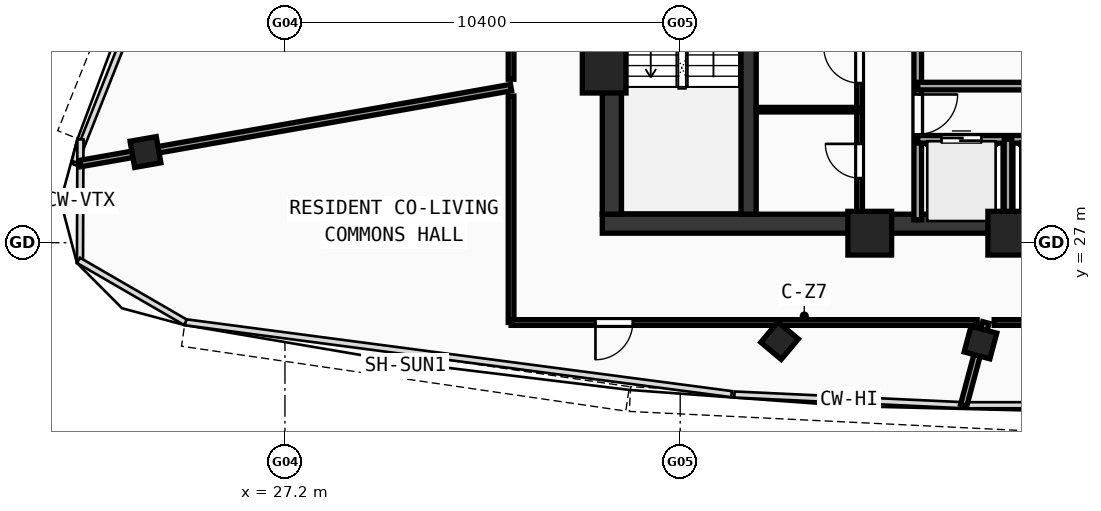
"""IFC4 building model, lengths in metres.
Left out: names, types, materials, properties, quantities, classifications, styles, units other than length and angle.
Written with IfcOpenShell. Run it as: python <this file> out.ifc"""

import sys

from ifc_helpers import new_model, si_unit, direction, frame, frame_2d, origin, origin_with_axes, origin_2d, place, context, subcontext, project, spatial, rectangle, hollow_rectangle, extrude, source, transform, mapped, element, fill, save


model = new_model("IFC4")
c1 = context("Model", 3, precision=1e-05, world=origin(), true_north=direction((0.0, 1.0)))
c2 = subcontext(c1, "Body", "Model", "MODEL_VIEW")
j1 = project(units=[si_unit("LENGTHUNIT", "METRE"), si_unit("PLANEANGLEUNIT", "RADIAN")], contexts=[c1])
p1 = place(None, origin())
s1 = spatial("IfcSite", under=j1, at=p1, CompositionType="ELEMENT")
p2 = place(p1, origin())
s2 = spatial("IfcBuilding", under=s1, at=p2, CompositionType="ELEMENT")
p3 = place(p2, frame((0.0, 0.0, 359.26)))
s3 = spatial("IfcBuildingStorey", under=s2, at=p3, CompositionType="ELEMENT", Elevation=359.26)
p4 = place(p3, frame((35.55, 27.5, 0.0), z_axis=(0.0, 0.0, 1.0), x_axis=(1.0, 0.0, 0.0)))
e1 = element("IfcWall", 1, at=p4, inside=s3, PredefinedType="SHEAR", context=c2, shape_type="SweptSolid", body=[
    extrude(rectangle(XDim=24.9, YDim=0.5, at=frame_2d((12.45, 0.0))), origin(), (0.0, 0.0, 1.0), 3.49),
])
p5 = place(p3, frame((35.8, 27.75, 0.0), z_axis=(0.0, 0.0, 1.0), x_axis=(0.0, 1.0, 0.0)))
e2 = element("IfcWall", 2, at=p5, inside=s3, PredefinedType="SHEAR", context=c2, shape_type="SweptSolid", body=[
    extrude(rectangle(XDim=12.2, YDim=0.5, at=frame_2d((6.1, 0.0))), origin(), (0.0, 0.0, 1.0), 3.49),
])
p6 = place(p3, frame((39.4, 27.75, 0.0), z_axis=(0.0, 0.0, 1.0), x_axis=(0.0, 1.0, 0.0)))
e3 = element("IfcWall", 3, at=p6, inside=s3, PredefinedType="SHEAR", context=c2, shape_type="SweptSolid", body=[
    extrude(rectangle(XDim=12.2, YDim=0.4, at=frame_2d((6.1, 0.0))), origin(), (0.0, 0.0, 1.0), 3.49),
])
p7 = place(p6, frame((10.0, 0.0, 0.0)))
e4 = element("IfcOpeningElement", 4, at=p7, cuts=e3, PredefinedType="OPENING", context=c2, shape_type="SweptSolid", body=[
    extrude(rectangle(XDim=1.1, YDim=2.1, at=frame_2d((0.55, 1.05))), frame((0.0, 0.21, 0.0), z_axis=(0.0, -1.0, 0.0), x_axis=(1.0, 0.0, 0.0)), (0.0, 0.0, 1.0), 0.42),
])
m1 = source(origin(), c2, "Body", "SweptSolid", [
    extrude(hollow_rectangle(XDim=1.15, YDim=1.15, WallThickness=0.048, at=origin_2d()), origin(), (0.0, 0.0, 1.0), 3.75),
])
for number, where, z_axis, x_axis in (
    (5, (42.588, 27.25, -0.26), (0.0, 0.0, 1.0), (1.0, 0.0, 0.0)),
    (6, (46.272, 27.25, -0.26), (0.0, 0.0, 1.0), (1.0, 0.0, 0.0)),
    (7, (35.6, 31.513, -0.26), (0.0, 0.0, 1.0), (1.0, 0.0, 0.0)),
):
    element("IfcColumn", number, at=place(p3, frame(where, z_axis=z_axis, x_axis=x_axis)), inside=s3, PredefinedType="COLUMN", context=c2, shape_type="MappedRepresentation", body=[
        mapped(m1, transform((0.0, 0.0, 0.0), scale=1.0)),
    ])
m2 = source(origin(), c2, "Body", "SweptSolid", [
    extrude(hollow_rectangle(XDim=0.7, YDim=0.7, WallThickness=0.026, at=origin_2d()), origin(), (0.0, 0.0, 1.0), 3.75),
])
for number, where, z_axis, x_axis in (
    (8, (40.215, 24.422, -0.26), (0.0, 0.0, 1.0), (0.766, -0.643, 0.0)),
    (9, (45.501, 24.373, -0.26), (0.0, 0.0, 1.0), (0.966, -0.259, 0.0)),
    (10, (23.53, 29.385, -0.26), (0.0, 0.0, 1.0), (0.174, -0.985, 0.0)),
):
    element("IfcColumn", number, at=place(p3, frame(where, z_axis=z_axis, x_axis=x_axis)), inside=s3, PredefinedType="COLUMN", context=c2, shape_type="MappedRepresentation", body=[
        mapped(m2, transform((0.0, 0.0, 0.0), scale=1.0)),
    ])
p8 = place(p3, frame((43.85, 27.6, 0.0), z_axis=(0.0, 0.0, 1.0), x_axis=(0.0, 1.0, 0.0)))
e11 = element("IfcWall", 11, at=p8, inside=s3, PredefinedType="SOLIDWALL", context=c2, shape_type="SweptSolid", body=[
    extrude(rectangle(XDim=6.22, YDim=0.2, at=frame_2d((3.11, 0.0))), origin(), (0.0, 0.0, 1.0), 3.49),
])
p9 = place(p8, frame((2.25, 0.0, 0.0)))
e12 = element("IfcOpeningElement", 12, at=p9, cuts=e11, PredefinedType="OPENING", context=c2, shape_type="SweptSolid", body=[
    extrude(rectangle(XDim=1.05, YDim=2.1, at=frame_2d((0.525, 1.05))), frame((0.0, 0.11, 0.0), z_axis=(0.0, -1.0, 0.0), x_axis=(1.0, 0.0, 0.0)), (0.0, 0.0, 1.0), 0.22),
])
p10 = place(p3, frame((43.85, 29.72, 0.0), z_axis=(0.0, 0.0, 1.0), x_axis=(1.0, 0.0, 0.0)))
e13 = element("IfcWall", 13, at=p10, inside=s3, PredefinedType="SOLIDWALL", context=c2, shape_type="SweptSolid", body=[
    extrude(rectangle(XDim=7.2, YDim=0.2, at=frame_2d((3.6, 0.0))), origin(), (0.0, 0.0, 1.0), 3.49),
])
p11 = place(p10, frame((0.625, 0.0, 0.0)))
e14 = element("IfcOpeningElement", 14, at=p11, cuts=e13, PredefinedType="OPENING", context=c2, shape_type="SweptSolid", body=[
    extrude(rectangle(XDim=1.05, YDim=2.1, at=frame_2d((0.525, 1.05))), frame((0.0, 0.11, 0.0), z_axis=(0.0, -1.0, 0.0), x_axis=(1.0, 0.0, 0.0)), (0.0, 0.0, 1.0), 0.22),
])
p12 = place(p10, frame((3.075, 0.0, 0.0)))
e15 = element("IfcOpeningElement", 15, at=p12, cuts=e13, PredefinedType="OPENING", context=c2, shape_type="SweptSolid", body=[
    extrude(rectangle(XDim=1.05, YDim=2.1, at=frame_2d((0.525, 1.05))), frame((0.0, 0.11, 0.0), z_axis=(0.0, -1.0, 0.0), x_axis=(1.0, 0.0, 0.0)), (0.0, 0.0, 1.0), 0.22),
])
p13 = place(p10, frame((5.525, 0.0, 0.0)))
e16 = element("IfcOpeningElement", 16, at=p13, cuts=e13, PredefinedType="OPENING", context=c2, shape_type="SweptSolid", body=[
    extrude(rectangle(XDim=1.05, YDim=2.1, at=frame_2d((0.525, 1.05))), frame((0.0, 0.11, 0.0), z_axis=(0.0, -1.0, 0.0), x_axis=(1.0, 0.0, 0.0)), (0.0, 0.0, 1.0), 0.22),
])
p14 = place(p3, frame((43.85, 31.12, 0.0), z_axis=(0.0, 0.0, 1.0), x_axis=(1.0, 0.0, 0.0)))
e17 = element("IfcWall", 17, at=p14, inside=s3, PredefinedType="SOLIDWALL", context=c2, shape_type="SweptSolid", body=[
    extrude(rectangle(XDim=9.83, YDim=0.2, at=frame_2d((4.915, 0.0))), origin(), (0.0, 0.0, 1.0), 3.49),
])
p15 = place(p3, frame((46.225, 27.6, 0.0), z_axis=(0.0, 0.0, 1.0), x_axis=(0.0, 1.0, 0.0)))
e18 = element("IfcWall", 18, at=p15, inside=s3, PredefinedType="SOLIDWALL", context=c2, shape_type="SweptSolid", body=[
    extrude(rectangle(XDim=2.12, YDim=0.2, at=frame_2d((1.06, 0.0))), origin(), (0.0, 0.0, 1.0), 3.49),
])
p16 = place(p3, frame((42.32, 27.6, 0.0), z_axis=(0.0, 0.0, 1.0), x_axis=(0.0, 1.0, 0.0)))
e19 = element("IfcWall", 19, at=p16, inside=s3, PredefinedType="PARTITIONING", context=c2, shape_type="SweptSolid", body=[
    extrude(rectangle(XDim=5.9, YDim=0.15, at=frame_2d((2.95, 0.0))), origin(), (0.0, 0.0, 1.0), 3.49),
])
p17 = place(p16, frame((1.1, 0.0, 0.0)))
e20 = element("IfcOpeningElement", 20, at=p17, cuts=e19, PredefinedType="OPENING", context=c2, shape_type="SweptSolid", body=[
    extrude(rectangle(XDim=0.9, YDim=2.1, at=frame_2d((0.45, 1.05))), frame((0.0, 0.085, 0.0), z_axis=(0.0, -1.0, 0.0), x_axis=(1.0, 0.0, 0.0)), (0.0, 0.0, 1.0), 0.17),
])
p18 = place(p16, frame((3.6, 0.0, 0.0)))
e21 = element("IfcOpeningElement", 21, at=p18, cuts=e19, PredefinedType="OPENING", context=c2, shape_type="SweptSolid", body=[
    extrude(rectangle(XDim=0.94, YDim=2.1, at=frame_2d((0.47, 1.05))), frame((0.0, 0.085, 0.0), z_axis=(0.0, -1.0, 0.0), x_axis=(1.0, 0.0, 0.0)), (0.0, 0.0, 1.0), 0.17),
])
p19 = place(p3, frame((39.6, 30.5, 0.0), z_axis=(0.0, 0.0, 1.0), x_axis=(1.0, 0.0, 0.0)))
e22 = element("IfcWall", 22, at=p19, inside=s3, PredefinedType="PARTITIONING", context=c2, shape_type="SweptSolid", body=[
    extrude(rectangle(XDim=2.72, YDim=0.12, at=frame_2d((1.36, 0.0))), origin(), (0.0, 0.0, 1.0), 3.49),
])
p20 = place(p3, frame((33.15, 31.082, 0.0), z_axis=(0.0, 0.0, 1.0), x_axis=(-0.984809370591, -0.17363900367, 0.0)))
e23 = element("IfcWall", 23, at=p20, inside=s3, PredefinedType="PARTITIONING", context=c2, shape_type="SweptSolid", body=[
    extrude(rectangle(XDim=11.517, YDim=0.17, at=frame_2d((5.758, 0.0))), origin(), (0.0, 0.0, 1.0), 2.89),
])
p21 = place(p3, frame((45.642, 24.9, 0.0), z_axis=(0.0, 0.0, 1.0), x_axis=(-0.258842593831, -0.965919516119, 0.0)))
e24 = element("IfcWall", 24, at=p21, inside=s3, PredefinedType="PARTITIONING", context=c2, shape_type="SweptSolid", body=[
    extrude(rectangle(XDim=2.253, YDim=0.17, at=frame_2d((1.127, 0.0))), origin(), (0.0, 0.0, 1.0), 2.89),
])
p22 = place(p3, frame((33.15, 24.9, 0.0), z_axis=(0.0, 0.0, 1.0), x_axis=(0.0, 1.0, 0.0)))
e25 = element("IfcWall", 25, at=p22, inside=s3, PredefinedType="PARTITIONING", context=c2, shape_type="SweptSolid", body=[
    extrude(rectangle(XDim=5.958, YDim=0.15, at=frame_2d((2.979, 0.0))), origin(), (0.0, 0.0, 1.0), 2.89),
])
p23 = place(p3, frame((33.15, 31.301, 0.0), z_axis=(0.0, 0.0, 1.0), x_axis=(0.0, 1.0, 0.0)))
e26 = element("IfcWall", 26, at=p23, inside=s3, PredefinedType="PARTITIONING", context=c2, shape_type="SweptSolid", body=[
    extrude(rectangle(XDim=7.004, YDim=0.15, at=frame_2d((3.502, 0.0))), origin(), (0.0, 0.0, 1.0), 3.49),
])
p24 = place(p23, frame((3.027, 0.0, 0.0)))
e27 = element("IfcOpeningElement", 27, at=p24, cuts=e26, PredefinedType="OPENING", context=c2, shape_type="SweptSolid", body=[
    extrude(rectangle(XDim=0.98, YDim=2.12, at=frame_2d((0.49, 1.06))), frame((0.0, 0.085, 0.0), z_axis=(0.0, -1.0, 0.0), x_axis=(1.0, 0.0, 0.0)), (0.0, 0.0, 1.0), 0.17),
])
p25 = place(p3, frame((47.78, 24.9, 0.0), z_axis=(0.0, 0.0, 1.0), x_axis=(-1.0, 0.0, 0.0)))
e28 = element("IfcWall", 28, at=p25, inside=s3, PredefinedType="PARTITIONING", context=c2, shape_type="SweptSolid", body=[
    extrude(rectangle(XDim=1.918, YDim=0.15, at=frame_2d((0.959, 0.0))), origin(), (0.0, 0.0, 1.0), 3.49),
])
p26 = place(p3, frame((45.414, 24.9, 0.0), z_axis=(0.0, 0.0, 1.0), x_axis=(-1.0, 0.0, 0.0)))
e29 = element("IfcWall", 29, at=p26, inside=s3, PredefinedType="PARTITIONING", context=c2, shape_type="SweptSolid", body=[
    extrude(rectangle(XDim=12.264, YDim=0.15, at=frame_2d((6.132, 0.0))), origin(), (0.0, 0.0, 1.0), 2.89),
])
p27 = place(p26, frame((9.064, 0.0, 0.0)))
e30 = element("IfcOpeningElement", 30, at=p27, cuts=e29, PredefinedType="OPENING", context=c2, shape_type="SweptSolid", body=[
    extrude(rectangle(XDim=0.98, YDim=2.12, at=frame_2d((0.49, 1.06))), frame((0.0, 0.085, 0.0), z_axis=(0.0, -1.0, 0.0), x_axis=(1.0, 0.0, 0.0)), (0.0, 0.0, 1.0), 0.17),
])
m3 = source(origin(), c2, "Body", "SweptSolid", [
    extrude(rectangle(XDim=1.05, YDim=2.1, at=frame_2d((0.525, 1.05))), frame((0.0, 0.025, 0.0), z_axis=(0.0, -1.0, 0.0), x_axis=(1.0, 0.0, 0.0)), (0.0, 0.0, 1.0), 0.05),
])
p28 = place(p9, frame((1.05, 0.0, 0.0), z_axis=(0.0, 0.0, 1.0), x_axis=(-1.0, 0.0, 0.0)))
e31 = element("IfcDoor", 31, at=p28, inside=s3, OperationType="SINGLE_SWING_LEFT", PredefinedType="DOOR", context=c2, shape_type="MappedRepresentation", body=[
    mapped(m3, transform((0.0, 0.0, 0.0), scale=1.0)),
])
fill(e12, e31)
p29 = place(p11, origin_with_axes())
e32 = element("IfcDoor", 32, at=p29, inside=s3, OperationType="DOUBLE_DOOR_SLIDING", PredefinedType="DOOR", context=c2, shape_type="MappedRepresentation", body=[
    mapped(m3, transform((0.0, 0.0, 0.0), scale=1.0)),
])
fill(e14, e32)
m4 = source(origin(), c2, "Body", "SweptSolid", [
    extrude(rectangle(XDim=0.9, YDim=2.1, at=frame_2d((0.45, 1.05))), frame((0.0, 0.025, 0.0), z_axis=(0.0, -1.0, 0.0), x_axis=(1.0, 0.0, 0.0)), (0.0, 0.0, 1.0), 0.05),
])
p30 = place(p17, origin_with_axes())
e33 = element("IfcDoor", 33, at=p30, inside=s3, OperationType="SINGLE_SWING_RIGHT", PredefinedType="DOOR", context=c2, shape_type="MappedRepresentation", body=[
    mapped(m4, transform((0.0, 0.0, 0.0), scale=1.0)),
])
fill(e20, e33)
m5 = source(origin(), c2, "Body", "SweptSolid", [
    extrude(rectangle(XDim=0.94, YDim=2.1, at=frame_2d((0.47, 1.05))), frame((0.0, 0.025, 0.0), z_axis=(0.0, -1.0, 0.0), x_axis=(1.0, 0.0, 0.0)), (0.0, 0.0, 1.0), 0.05),
])
p31 = place(p18, origin_with_axes())
e34 = element("IfcDoor", 34, at=p31, inside=s3, OperationType="SINGLE_SWING_RIGHT", PredefinedType="DOOR", context=c2, shape_type="MappedRepresentation", body=[
    mapped(m5, transform((0.0, 0.0, 0.0), scale=1.0)),
])
fill(e21, e34)
m6 = source(origin(), c2, "Body", "SweptSolid", [
    extrude(rectangle(XDim=0.98, YDim=2.12, at=frame_2d((0.49, 1.06))), frame((0.0, 0.025, 0.0), z_axis=(0.0, -1.0, 0.0), x_axis=(1.0, 0.0, 0.0)), (0.0, 0.0, 1.0), 0.05),
])
p32 = place(p27, origin_with_axes())
e35 = element("IfcDoor", 35, at=p32, inside=s3, OperationType="SINGLE_SWING_RIGHT", PredefinedType="DOOR", context=c2, shape_type="MappedRepresentation", body=[
    mapped(m6, transform((0.0, 0.0, 0.0), scale=1.0)),
])
fill(e30, e35)
save(model, sys.argv[1])
